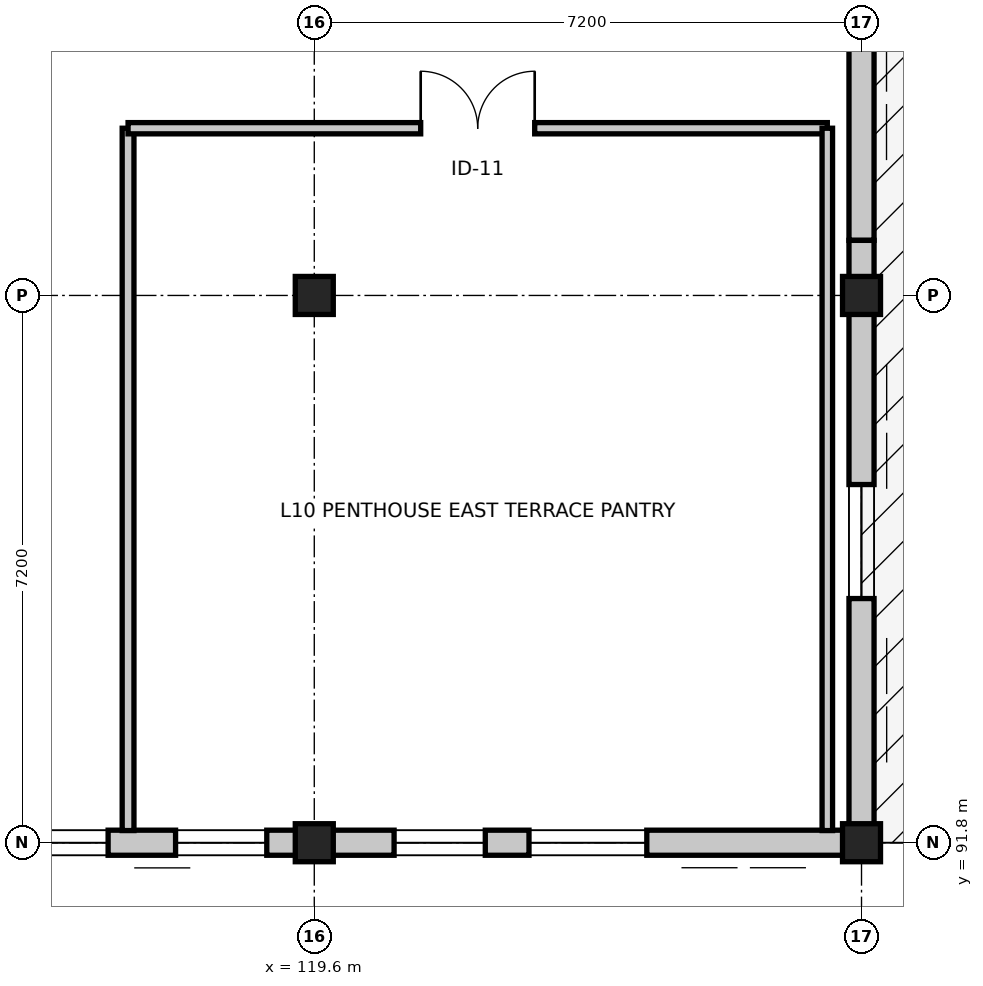
"""IFC4 building model, lengths in metres.
Left out: names, types, materials, properties, quantities, classifications, styles, units other than length and angle.
Written with IfcOpenShell. Run it as: python <this file> out.ifc"""

import sys

from ifc_helpers import new_model, si_unit, direction, frame, frame_2d, origin, origin_2d, place, context, subcontext, project, spatial, rectangle, extrude, element, fill, save


model = new_model("IFC4")
c1 = context("Model", 3, precision=1e-05, world=origin(), true_north=direction((0.0, 1.0)))
c2 = subcontext(c1, "Body", "Model", "MODEL_VIEW")
j1 = project(units=[si_unit("LENGTHUNIT", "METRE"), si_unit("PLANEANGLEUNIT", "RADIAN")], contexts=[c1])
p1 = place(None, origin())
s1 = spatial("IfcSite", under=j1, at=p1, CompositionType="ELEMENT")
p2 = place(p1, origin())
s2 = spatial("IfcBuilding", under=s1, at=p2, CompositionType="ELEMENT")
p3 = place(p2, frame((0.0, 0.0, 40.8)))
s3 = spatial("IfcBuildingStorey", under=s2, at=p3, CompositionType="ELEMENT", Elevation=40.8)
for number, where, z_axis, x_axis in (
    (1, (119.6, 91.8, 0.0), (0.0, 0.0, 1.0), (1.0, 0.0, 0.0)),
    (2, (119.6, 99.0, 0.0), (0.0, 0.0, 1.0), (1.0, 0.0, 0.0)),
):
    element("IfcColumn", number, at=place(p3, frame(where, z_axis=z_axis, x_axis=x_axis)), inside=s3, PredefinedType="COLUMN", context=c2, shape_type="SweptSolid", body=[
        extrude(rectangle(XDim=0.5, YDim=0.5, at=origin_2d()), origin(), (0.0, 0.0, 1.0), 5.5),
    ])
for number, where, z_axis, x_axis in (
    (3, (126.8, 91.8, 0.0), (0.0, 0.0, 1.0), (1.0, 0.0, 0.0)),
    (4, (126.8, 99.0, 0.0), (0.0, 0.0, 1.0), (1.0, 0.0, 0.0)),
):
    element("IfcColumn", number, at=place(p3, frame(where, z_axis=z_axis, x_axis=x_axis)), inside=s3, PredefinedType="COLUMN", context=c2, shape_type="SweptSolid", body=[
        extrude(rectangle(XDim=0.5, YDim=0.5, at=origin_2d()), origin(), (0.0, 0.0, 1.0), 3.6),
    ])
p4 = place(p3, frame((126.8, 107.649, 0.0), z_axis=(0.0, 0.0, 1.0), x_axis=(0.0, -1.0, 0.0)))
e5 = element("IfcWall", 5, at=p4, inside=s3, PredefinedType="STANDARD", context=c2, shape_type="SweptSolid", body=[
    extrude(rectangle(XDim=7.925, YDim=0.33, at=frame_2d((3.962, 0.0))), origin(), (0.0, 0.0, 1.0), 2.715),
])
p5 = place(p4, frame((3.212, 0.0, 0.75)))
e6 = element("IfcOpeningElement", 6, at=p5, cuts=e5, PredefinedType="OPENING", context=c2, shape_type="SweptSolid", body=[
    extrude(rectangle(XDim=1.5, YDim=1.5, at=frame_2d((0.75, 0.75))), frame((0.0, 0.175, 0.0), z_axis=(0.0, -1.0, 0.0), x_axis=(1.0, 0.0, 0.0)), (0.0, 0.0, 1.0), 0.35),
])
p6 = place(p3, frame((126.8, 99.725, 0.0), z_axis=(0.0, 0.0, 1.0), x_axis=(0.0, -1.0, 0.0)))
e7 = element("IfcWall", 7, at=p6, inside=s3, PredefinedType="STANDARD", context=c2, shape_type="SweptSolid", body=[
    extrude(rectangle(XDim=7.925, YDim=0.33, at=frame_2d((3.962, 0.0))), origin(), (0.0, 0.0, 1.0), 2.715),
])
p7 = place(p6, frame((3.212, 0.0, 0.75)))
e8 = element("IfcOpeningElement", 8, at=p7, cuts=e7, PredefinedType="OPENING", context=c2, shape_type="SweptSolid", body=[
    extrude(rectangle(XDim=1.5, YDim=1.5, at=frame_2d((0.75, 0.75))), frame((0.0, 0.175, 0.0), z_axis=(0.0, -1.0, 0.0), x_axis=(1.0, 0.0, 0.0)), (0.0, 0.0, 1.0), 0.35),
])
p8 = place(p3, frame((126.8, 91.8, 0.0), z_axis=(0.0, 0.0, 1.0), x_axis=(-1.0, 0.0, 0.0)))
e9 = element("IfcWall", 9, at=p8, inside=s3, PredefinedType="STANDARD", context=c2, shape_type="SweptSolid", body=[
    extrude(rectangle(XDim=7.2, YDim=0.33, at=frame_2d((3.6, 0.0))), origin(), (0.0, 0.0, 1.0), 2.86),
])
p9 = place(p8, frame((2.825, 0.0, 0.75)))
e10 = element("IfcOpeningElement", 10, at=p9, cuts=e9, PredefinedType="OPENING", context=c2, shape_type="SweptSolid", body=[
    extrude(rectangle(XDim=1.55, YDim=1.75, at=frame_2d((0.775, 0.875))), frame((0.0, 0.175, 0.0), z_axis=(0.0, -1.0, 0.0), x_axis=(1.0, 0.0, 0.0)), (0.0, 0.0, 1.0), 0.35),
])
p10 = place(p8, frame((4.95, 0.0, 0.85)))
e11 = element("IfcOpeningElement", 11, at=p10, cuts=e9, PredefinedType="OPENING", context=c2, shape_type="SweptSolid", body=[
    extrude(rectangle(XDim=1.2, YDim=1.8, at=frame_2d((0.6, 0.9))), frame((0.0, 0.175, 0.0), z_axis=(0.0, -1.0, 0.0), x_axis=(1.0, 0.0, 0.0)), (0.0, 0.0, 1.0), 0.35),
])
p11 = place(p3, frame((119.6, 91.8, 0.0), z_axis=(0.0, 0.0, 1.0), x_axis=(-1.0, 0.0, 0.0)))
e12 = element("IfcWall", 12, at=p11, inside=s3, PredefinedType="STANDARD", context=c2, shape_type="SweptSolid", body=[
    extrude(rectangle(XDim=7.2, YDim=0.33, at=frame_2d((3.6, 0.0))), origin(), (0.0, 0.0, 1.0), 2.765),
])
p12 = place(p11, frame((0.625, 0.0, 0.75)))
e13 = element("IfcOpeningElement", 13, at=p12, cuts=e12, PredefinedType="OPENING", context=c2, shape_type="SweptSolid", body=[
    extrude(rectangle(XDim=1.2, YDim=1.75, at=frame_2d((0.6, 0.875))), frame((0.0, 0.175, 0.0), z_axis=(0.0, -1.0, 0.0), x_axis=(1.0, 0.0, 0.0)), (0.0, 0.0, 1.0), 0.35),
])
p13 = place(p11, frame((4.95, 0.0, 0.85)))
e14 = element("IfcOpeningElement", 14, at=p13, cuts=e12, PredefinedType="OPENING", context=c2, shape_type="SweptSolid", body=[
    extrude(rectangle(XDim=1.2, YDim=1.8, at=frame_2d((0.6, 0.9))), frame((0.0, 0.175, 0.0), z_axis=(0.0, -1.0, 0.0), x_axis=(1.0, 0.0, 0.0)), (0.0, 0.0, 1.0), 0.35),
])
p14 = place(p11, frame((2.712, 0.0, 0.75)))
e15 = element("IfcOpeningElement", 15, at=p14, cuts=e12, PredefinedType="OPENING", context=c2, shape_type="SweptSolid", body=[
    extrude(rectangle(XDim=1.2, YDim=1.75, at=frame_2d((0.6, 0.875))), frame((0.0, 0.175, 0.0), z_axis=(0.0, -1.0, 0.0), x_axis=(1.0, 0.0, 0.0)), (0.0, 0.0, 1.0), 0.35),
])
p15 = place(p3, frame((117.15, 91.96, 0.0), z_axis=(0.0, 0.0, 1.0), x_axis=(0.0, 1.0, 0.0)))
e16 = element("IfcWall", 16, at=p15, inside=s3, PredefinedType="PARTITIONING", context=c2, shape_type="SweptSolid", body=[
    extrude(rectangle(XDim=9.24, YDim=0.155, at=frame_2d((4.62, 0.0))), origin(), (0.0, 0.0, 1.0), 2.765),
])
p16 = place(p3, frame((117.15, 101.2, 0.0), z_axis=(0.0, 0.0, 1.0), x_axis=(1.0, 0.0, 0.0)))
e17 = element("IfcWall", 17, at=p16, inside=s3, PredefinedType="PARTITIONING", context=c2, shape_type="SweptSolid", body=[
    extrude(rectangle(XDim=9.2, YDim=0.148, at=frame_2d((4.6, 0.0))), origin(), (0.0, 0.0, 1.0), 2.715),
])
p17 = place(p16, frame((3.85, 0.0, 0.0)))
e18 = element("IfcOpeningElement", 18, at=p17, cuts=e17, PredefinedType="OPENING", context=c2, shape_type="SweptSolid", body=[
    extrude(rectangle(XDim=1.5, YDim=2.2, at=frame_2d((0.75, 1.1))), frame((0.0, 0.084, 0.0), z_axis=(0.0, -1.0, 0.0), x_axis=(1.0, 0.0, 0.0)), (0.0, 0.0, 1.0), 0.168),
])
p18 = place(p3, frame((126.35, 101.2, 0.0), z_axis=(0.0, 0.0, 1.0), x_axis=(0.0, -1.0, 0.0)))
e19 = element("IfcWall", 19, at=p18, inside=s3, PredefinedType="PARTITIONING", context=c2, shape_type="SweptSolid", body=[
    extrude(rectangle(XDim=9.24, YDim=0.138, at=frame_2d((4.62, 0.0))), origin(), (0.0, 0.0, 1.0), 2.86),
])
p19 = place(p7, origin())
e20 = element("IfcWindow", 20, at=p19, inside=s3, PartitioningType="SINGLE_PANEL", PredefinedType="WINDOW", context=c2, shape_type="SweptSolid", body=[
    extrude(rectangle(XDim=1.5, YDim=1.5, at=frame_2d((0.75, 0.75))), frame((0.0, 0.03, 0.0), z_axis=(0.0, -1.0, 0.0), x_axis=(1.0, 0.0, 0.0)), (0.0, 0.0, 1.0), 0.06),
])
fill(e8, e20)
p20 = place(p9, origin())
e21 = element("IfcWindow", 21, at=p20, inside=s3, PartitioningType="SINGLE_PANEL", PredefinedType="WINDOW", context=c2, shape_type="SweptSolid", body=[
    extrude(rectangle(XDim=1.55, YDim=1.75, at=frame_2d((0.775, 0.875))), frame((0.0, 0.03, 0.0), z_axis=(0.0, -1.0, 0.0), x_axis=(1.0, 0.0, 0.0)), (0.0, 0.0, 1.0), 0.06),
])
fill(e10, e21)
p21 = place(p10, origin())
e22 = element("IfcWindow", 22, at=p21, inside=s3, PartitioningType="SINGLE_PANEL", PredefinedType="WINDOW", context=c2, shape_type="SweptSolid", body=[
    extrude(rectangle(XDim=1.2, YDim=1.8, at=frame_2d((0.6, 0.9))), frame((0.0, 0.03, 0.0), z_axis=(0.0, -1.0, 0.0), x_axis=(1.0, 0.0, 0.0)), (0.0, 0.0, 1.0), 0.06),
])
fill(e11, e22)
p22 = place(p12, origin())
e23 = element("IfcWindow", 23, at=p22, inside=s3, PartitioningType="SINGLE_PANEL", PredefinedType="WINDOW", context=c2, shape_type="SweptSolid", body=[
    extrude(rectangle(XDim=1.2, YDim=1.75, at=frame_2d((0.6, 0.875))), frame((0.0, 0.03, 0.0), z_axis=(0.0, -1.0, 0.0), x_axis=(1.0, 0.0, 0.0)), (0.0, 0.0, 1.0), 0.06),
])
fill(e13, e23)
p23 = place(p17, origin())
e24 = element("IfcDoor", 24, at=p23, inside=s3, OperationType="DOUBLE_DOOR_SINGLE_SWING", PredefinedType="DOOR", context=c2, shape_type="SweptSolid", body=[
    extrude(rectangle(XDim=1.5, YDim=2.2, at=frame_2d((0.75, 1.1))), frame((0.0, 0.025, 0.0), z_axis=(0.0, -1.0, 0.0), x_axis=(1.0, 0.0, 0.0)), (0.0, 0.0, 1.0), 0.05),
])
fill(e18, e24)
p24 = place(p14, origin())
e25 = element("IfcWindow", 25, at=p24, inside=s3, PartitioningType="SINGLE_PANEL", PredefinedType="WINDOW", context=c2, shape_type="SweptSolid", body=[
    extrude(rectangle(XDim=1.2, YDim=1.75, at=frame_2d((0.6, 0.875))), frame((0.0, 0.03, 0.0), z_axis=(0.0, -1.0, 0.0), x_axis=(1.0, 0.0, 0.0)), (0.0, 0.0, 1.0), 0.06),
])
fill(e15, e25)
save(model, sys.argv[1])
